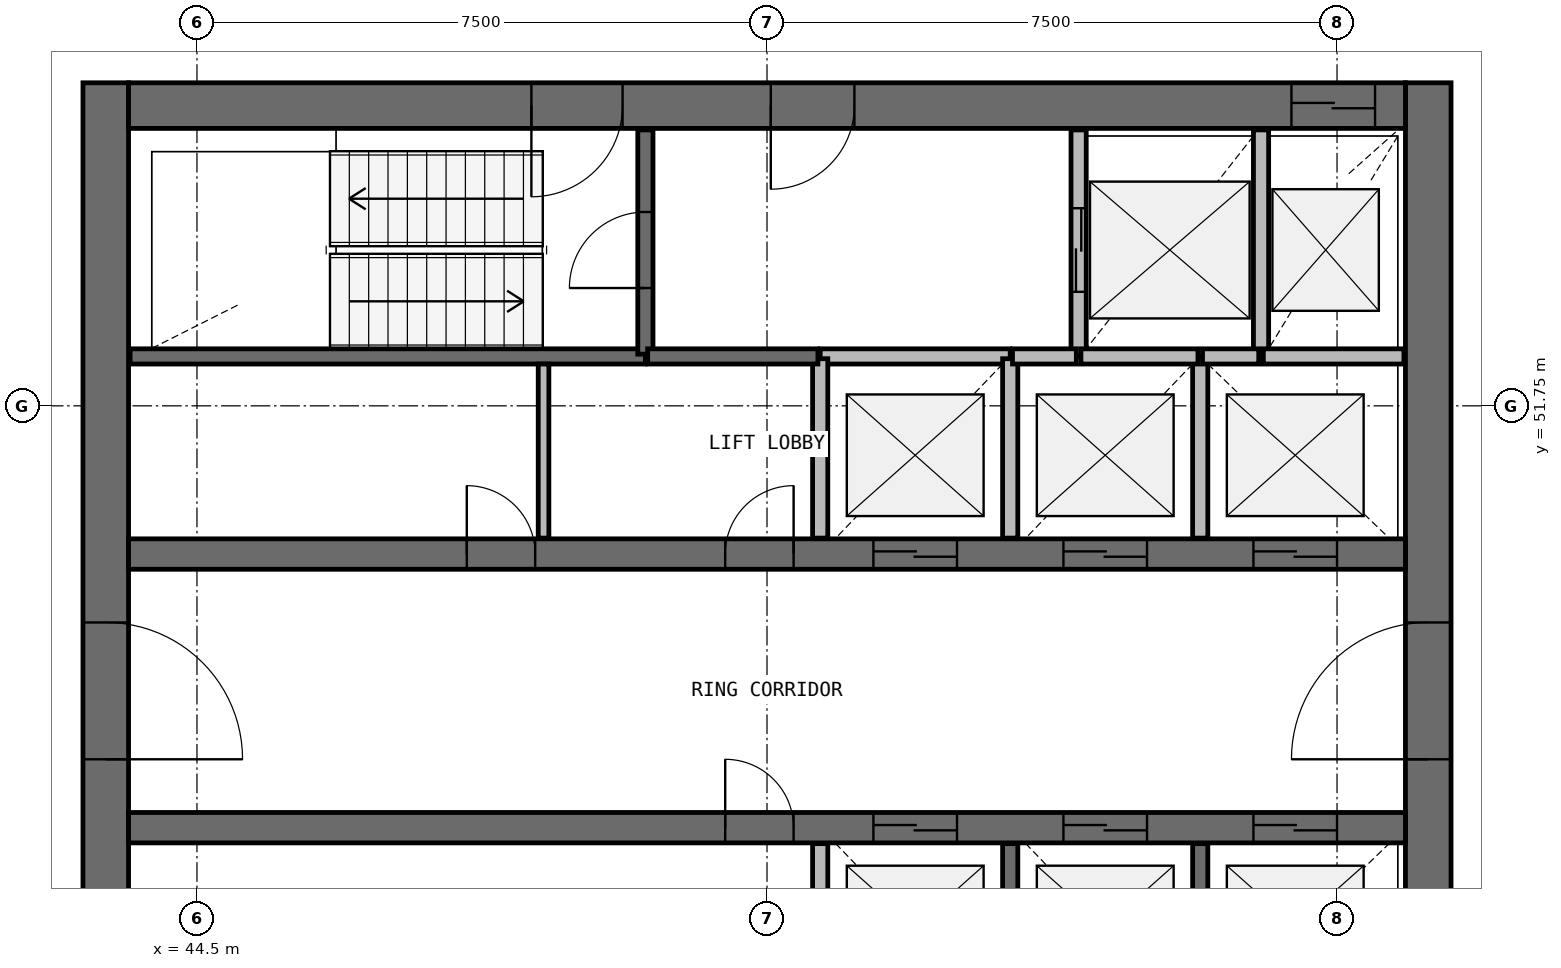
"""IFC4 building model, lengths in metres.
Left out: names, types, materials, properties, quantities, classifications, styles, units other than length and angle.
Written with IfcOpenShell. Run it as: python <this file> out.ifc"""

import sys

from ifc_helpers import new_model, si_unit, direction, frame, frame_2d, origin, place, context, subcontext, project, spatial, rectangle, extrude, source, transform, mapped, element, fill, save


model = new_model("IFC4")
c1 = context("Model", 3, precision=1e-05, world=origin(), true_north=direction((0.0, 1.0)))
c2 = subcontext(c1, "Body", "Model", "MODEL_VIEW")
j1 = project(units=[si_unit("LENGTHUNIT", "METRE"), si_unit("PLANEANGLEUNIT", "RADIAN")], contexts=[c1])
p1 = place(None, origin())
s1 = spatial("IfcSite", under=j1, at=p1, CompositionType="ELEMENT")
p2 = place(p1, origin())
s2 = spatial("IfcBuilding", under=s1, at=p2, CompositionType="ELEMENT")
p3 = place(p2, frame((0.0, 0.0, 234.5)))
s3 = spatial("IfcBuildingStorey", under=s2, at=p3, CompositionType="ELEMENT", Elevation=234.5)
p4 = place(p3, frame((60.7, 40.0, 0.0), z_axis=(0.0, 0.0, 1.0), x_axis=(0.0, 1.0, 0.0)))
e1 = element("IfcWall", 1, at=p4, inside=s3, PredefinedType="SHEAR", context=c2, shape_type="SweptSolid", body=[
    extrude(rectangle(XDim=16.0, YDim=0.6, at=frame_2d((8.0, 0.0))), origin(), (0.0, 0.0, 1.0), 3.9),
])
p5 = place(p4, frame((7.1, 0.0, 0.0)))
e2 = element("IfcOpeningElement", 2, at=p5, cuts=e1, PredefinedType="OPENING", context=c2, shape_type="SweptSolid", body=[
    extrude(rectangle(XDim=1.8, YDim=2.1, at=frame_2d((0.9, 1.05))), frame((0.0, 0.31, 0.0), z_axis=(0.0, -1.0, 0.0), x_axis=(1.0, 0.0, 0.0)), (0.0, 0.0, 1.0), 0.62),
])
p6 = place(p3, frame((43.3, 56.0, 0.0), z_axis=(0.0, 0.0, 1.0), x_axis=(0.0, -1.0, 0.0)))
e3 = element("IfcWall", 3, at=p6, inside=s3, PredefinedType="SHEAR", context=c2, shape_type="SweptSolid", body=[
    extrude(rectangle(XDim=16.0, YDim=0.6, at=frame_2d((8.0, 0.0))), origin(), (0.0, 0.0, 1.0), 3.9),
])
p7 = place(p6, frame((7.1, 0.0, 0.0)))
e4 = element("IfcOpeningElement", 4, at=p7, cuts=e3, PredefinedType="OPENING", context=c2, shape_type="SweptSolid", body=[
    extrude(rectangle(XDim=1.8, YDim=2.1, at=frame_2d((0.9, 1.05))), frame((0.0, 0.31, 0.0), z_axis=(0.0, -1.0, 0.0), x_axis=(1.0, 0.0, 0.0)), (0.0, 0.0, 1.0), 0.62),
])
p8 = place(p3, frame((60.4, 55.7, 0.0), z_axis=(0.0, 0.0, 1.0), x_axis=(-1.0, 0.0, 0.0)))
e5 = element("IfcWall", 5, at=p8, inside=s3, PredefinedType="SHEAR", context=c2, shape_type="SweptSolid", body=[
    extrude(rectangle(XDim=16.8, YDim=0.6, at=frame_2d((8.4, 0.0))), origin(), (0.0, 0.0, 1.0), 3.9),
])
p9 = place(p8, frame((0.4, 0.0, 0.0)))
e6 = element("IfcOpeningElement", 6, at=p9, cuts=e5, PredefinedType="OPENING", context=c2, shape_type="SweptSolid", body=[
    extrude(rectangle(XDim=1.1, YDim=2.1, at=frame_2d((0.55, 1.05))), frame((0.0, 0.31, 0.0), z_axis=(0.0, -1.0, 0.0), x_axis=(1.0, 0.0, 0.0)), (0.0, 0.0, 1.0), 0.62),
])
p10 = place(p8, frame((10.3, 0.0, 0.0)))
e7 = element("IfcOpeningElement", 7, at=p10, cuts=e5, PredefinedType="OPENING", context=c2, shape_type="SweptSolid", body=[
    extrude(rectangle(XDim=1.2, YDim=2.1, at=frame_2d((0.6, 1.05))), frame((0.0, 0.31, 0.0), z_axis=(0.0, -1.0, 0.0), x_axis=(1.0, 0.0, 0.0)), (0.0, 0.0, 1.0), 0.62),
])
p11 = place(p8, frame((7.25, 0.0, 0.0)))
e8 = element("IfcOpeningElement", 8, at=p11, cuts=e5, PredefinedType="OPENING", context=c2, shape_type="SweptSolid", body=[
    extrude(rectangle(XDim=1.1, YDim=2.1, at=frame_2d((0.55, 1.05))), frame((0.0, 0.31, 0.0), z_axis=(0.0, -1.0, 0.0), x_axis=(1.0, 0.0, 0.0)), (0.0, 0.0, 1.0), 0.62),
])
p12 = place(p3, frame((43.6, 49.8, 0.0), z_axis=(0.0, 0.0, 1.0), x_axis=(1.0, 0.0, 0.0)))
e9 = element("IfcWall", 9, at=p12, inside=s3, PredefinedType="SHEAR", context=c2, shape_type="SweptSolid", body=[
    extrude(rectangle(XDim=16.8, YDim=0.4, at=frame_2d((8.4, 0.0))), origin(), (0.0, 0.0, 1.0), 3.9),
])
p13 = place(p12, frame((9.8, 0.0, 0.0)))
e10 = element("IfcOpeningElement", 10, at=p13, cuts=e9, PredefinedType="OPENING", context=c2, shape_type="SweptSolid", body=[
    extrude(rectangle(XDim=1.1, YDim=2.1, at=frame_2d((0.55, 1.05))), frame((0.0, 0.21, 0.0), z_axis=(0.0, -1.0, 0.0), x_axis=(1.0, 0.0, 0.0)), (0.0, 0.0, 1.0), 0.42),
])
p14 = place(p12, frame((12.3, 0.0, 0.0)))
e11 = element("IfcOpeningElement", 11, at=p14, cuts=e9, PredefinedType="OPENING", context=c2, shape_type="SweptSolid", body=[
    extrude(rectangle(XDim=1.1, YDim=2.1, at=frame_2d((0.55, 1.05))), frame((0.0, 0.21, 0.0), z_axis=(0.0, -1.0, 0.0), x_axis=(1.0, 0.0, 0.0)), (0.0, 0.0, 1.0), 0.42),
])
p15 = place(p12, frame((14.8, 0.0, 0.0)))
e12 = element("IfcOpeningElement", 12, at=p15, cuts=e9, PredefinedType="OPENING", context=c2, shape_type="SweptSolid", body=[
    extrude(rectangle(XDim=1.1, YDim=2.1, at=frame_2d((0.55, 1.05))), frame((0.0, 0.21, 0.0), z_axis=(0.0, -1.0, 0.0), x_axis=(1.0, 0.0, 0.0)), (0.0, 0.0, 1.0), 0.42),
])
p16 = place(p12, frame((4.45, 0.0, 0.0)))
e13 = element("IfcOpeningElement", 13, at=p16, cuts=e9, PredefinedType="OPENING", context=c2, shape_type="SweptSolid", body=[
    extrude(rectangle(XDim=0.9, YDim=2.1, at=frame_2d((0.45, 1.05))), frame((0.0, 0.21, 0.0), z_axis=(0.0, -1.0, 0.0), x_axis=(1.0, 0.0, 0.0)), (0.0, 0.0, 1.0), 0.42),
])
p17 = place(p12, frame((7.85, 0.0, 0.0)))
e14 = element("IfcOpeningElement", 14, at=p17, cuts=e9, PredefinedType="OPENING", context=c2, shape_type="SweptSolid", body=[
    extrude(rectangle(XDim=0.9, YDim=2.1, at=frame_2d((0.45, 1.05))), frame((0.0, 0.21, 0.0), z_axis=(0.0, -1.0, 0.0), x_axis=(1.0, 0.0, 0.0)), (0.0, 0.0, 1.0), 0.42),
])
p18 = place(p3, frame((43.6, 46.2, 0.0), z_axis=(0.0, 0.0, 1.0), x_axis=(1.0, 0.0, 0.0)))
e15 = element("IfcWall", 15, at=p18, inside=s3, PredefinedType="SHEAR", context=c2, shape_type="SweptSolid", body=[
    extrude(rectangle(XDim=16.8, YDim=0.4, at=frame_2d((8.4, 0.0))), origin(), (0.0, 0.0, 1.0), 3.9),
])
p19 = place(p18, frame((9.8, 0.0, 0.0)))
e16 = element("IfcOpeningElement", 16, at=p19, cuts=e15, PredefinedType="OPENING", context=c2, shape_type="SweptSolid", body=[
    extrude(rectangle(XDim=1.1, YDim=2.1, at=frame_2d((0.55, 1.05))), frame((0.0, 0.21, 0.0), z_axis=(0.0, -1.0, 0.0), x_axis=(1.0, 0.0, 0.0)), (0.0, 0.0, 1.0), 0.42),
])
p20 = place(p18, frame((12.3, 0.0, 0.0)))
e17 = element("IfcOpeningElement", 17, at=p20, cuts=e15, PredefinedType="OPENING", context=c2, shape_type="SweptSolid", body=[
    extrude(rectangle(XDim=1.1, YDim=2.1, at=frame_2d((0.55, 1.05))), frame((0.0, 0.21, 0.0), z_axis=(0.0, -1.0, 0.0), x_axis=(1.0, 0.0, 0.0)), (0.0, 0.0, 1.0), 0.42),
])
p21 = place(p18, frame((14.8, 0.0, 0.0)))
e18 = element("IfcOpeningElement", 18, at=p21, cuts=e15, PredefinedType="OPENING", context=c2, shape_type="SweptSolid", body=[
    extrude(rectangle(XDim=1.1, YDim=2.1, at=frame_2d((0.55, 1.05))), frame((0.0, 0.21, 0.0), z_axis=(0.0, -1.0, 0.0), x_axis=(1.0, 0.0, 0.0)), (0.0, 0.0, 1.0), 0.42),
])
p22 = place(p18, frame((7.85, 0.0, 0.0)))
e19 = element("IfcOpeningElement", 19, at=p22, cuts=e15, PredefinedType="OPENING", context=c2, shape_type="SweptSolid", body=[
    extrude(rectangle(XDim=0.9, YDim=2.1, at=frame_2d((0.45, 1.05))), frame((0.0, 0.21, 0.0), z_axis=(0.0, -1.0, 0.0), x_axis=(1.0, 0.0, 0.0)), (0.0, 0.0, 1.0), 0.42),
])
p23 = place(p3, frame((43.62, 52.4, 0.0), z_axis=(0.0, 0.0, 1.0), x_axis=(1.0, 0.0, 0.0)))
e20 = element("IfcWall", 20, at=p23, inside=s3, PredefinedType="SOLIDWALL", context=c2, shape_type="SweptSolid", body=[
    extrude(rectangle(XDim=6.78, YDim=0.2, at=frame_2d((3.39, 0.0))), origin(), (0.0, 0.0, 1.0), 3.58),
])
p24 = place(p3, frame((50.4, 52.43, 0.0), z_axis=(0.0, 0.0, 1.0), x_axis=(0.0, 1.0, 0.0)))
e21 = element("IfcWall", 21, at=p24, inside=s3, PredefinedType="SOLIDWALL", context=c2, shape_type="SweptSolid", body=[
    extrude(rectangle(XDim=2.95, YDim=0.2, at=frame_2d((1.475, 0.0))), origin(), (0.0, 0.0, 1.0), 3.58),
])
p25 = place(p24, frame((0.87, 0.0, 0.0)))
e22 = element("IfcOpeningElement", 22, at=p25, cuts=e21, PredefinedType="OPENING", context=c2, shape_type="SweptSolid", body=[
    extrude(rectangle(XDim=1.0, YDim=2.1, at=frame_2d((0.5, 1.05))), frame((0.0, 0.11, 0.0), z_axis=(0.0, -1.0, 0.0), x_axis=(1.0, 0.0, 0.0)), (0.0, 0.0, 1.0), 0.22),
])
p26 = place(p3, frame((56.1, 55.38, 0.0), z_axis=(0.0, 0.0, 1.0), x_axis=(0.0, -1.0, 0.0)))
e23 = element("IfcWall", 23, at=p26, inside=s3, PredefinedType="SOLIDWALL", context=c2, shape_type="SweptSolid", body=[
    extrude(rectangle(XDim=2.98, YDim=0.2, at=frame_2d((1.49, 0.0))), origin(), (0.0, 0.0, 1.0), 3.58),
])
p27 = place(p26, frame((1.03, 0.0, 0.0)))
e24 = element("IfcOpeningElement", 24, at=p27, cuts=e23, PredefinedType="OPENING", context=c2, shape_type="SweptSolid", body=[
    extrude(rectangle(XDim=1.1, YDim=2.1, at=frame_2d((0.55, 1.05))), frame((0.0, 0.11, 0.0), z_axis=(0.0, -1.0, 0.0), x_axis=(1.0, 0.0, 0.0)), (0.0, 0.0, 1.0), 0.22),
])
p28 = place(p3, frame((58.5, 52.4, 0.0), z_axis=(0.0, 0.0, 1.0), x_axis=(0.0, 1.0, 0.0)))
e25 = element("IfcWall", 25, at=p28, inside=s3, PredefinedType="SOLIDWALL", context=c2, shape_type="SweptSolid", body=[
    extrude(rectangle(XDim=2.98, YDim=0.2, at=frame_2d((1.49, 0.0))), origin(), (0.0, 0.0, 1.0), 3.58),
])
p29 = place(p3, frame((55.2, 52.4, 0.0), z_axis=(0.0, 0.0, 1.0), x_axis=(-1.0, 0.0, 0.0)))
e26 = element("IfcWall", 26, at=p29, inside=s3, PredefinedType="SOLIDWALL", context=c2, shape_type="SweptSolid", body=[
    extrude(rectangle(XDim=2.5, YDim=0.2, at=frame_2d((1.25, 0.0))), origin(), (0.0, 0.0, 1.0), 3.58),
])
for number, where, z_axis, x_axis in (
    (27, (52.7, 45.99, 0.0), (0.0, 0.0, 1.0), (0.0, -1.0, 0.0)),
    (28, (52.7, 52.37, 0.0), (0.0, 0.0, 1.0), (0.0, -1.0, 0.0)),
    (29, (55.2, 43.63, 0.0), (0.0, 0.0, 1.0), (0.0, 1.0, 0.0)),
    (30, (55.2, 50.01, 0.0), (0.0, 0.0, 1.0), (0.0, 1.0, 0.0)),
    (31, (57.7, 43.63, 0.0), (0.0, 0.0, 1.0), (0.0, 1.0, 0.0)),
):
    element("IfcWall", number, at=place(p3, frame(where, z_axis=z_axis, x_axis=x_axis)), inside=s3, PredefinedType="SOLIDWALL", context=c2, shape_type="SweptSolid", body=[
        extrude(rectangle(XDim=2.36, YDim=0.2, at=frame_2d((1.18, 0.0))), origin(), (0.0, 0.0, 1.0), 3.58),
    ])
p30 = place(p3, frame((57.7, 50.01, 0.0), z_axis=(0.0, 0.0, 1.0), x_axis=(0.0, 1.0, 0.0)))
e32 = element("IfcWall", 32, at=p30, inside=s3, PredefinedType="SOLIDWALL", context=c2, shape_type="SweptSolid", body=[
    extrude(rectangle(XDim=2.39, YDim=0.2, at=frame_2d((1.195, 0.0))), origin(), (0.0, 0.0, 1.0), 3.58),
])
p31 = place(p3, frame((50.43, 52.4, 0.0), z_axis=(0.0, 0.0, 1.0), x_axis=(1.0, 0.0, 0.0)))
e33 = element("IfcWall", 33, at=p31, inside=s3, PredefinedType="SOLIDWALL", context=c2, shape_type="SweptSolid", body=[
    extrude(rectangle(XDim=2.24, YDim=0.2, at=frame_2d((1.12, 0.0))), origin(), (0.0, 0.0, 1.0), 3.58),
])
p32 = place(p3, frame((60.38, 52.4, 0.0), z_axis=(0.0, 0.0, 1.0), x_axis=(-1.0, 0.0, 0.0)))
e34 = element("IfcWall", 34, at=p32, inside=s3, PredefinedType="SOLIDWALL", context=c2, shape_type="SweptSolid", body=[
    extrude(rectangle(XDim=1.85, YDim=0.2, at=frame_2d((0.925, 0.0))), origin(), (0.0, 0.0, 1.0), 3.58),
])
p33 = place(p3, frame((57.67, 52.4, 0.0), z_axis=(0.0, 0.0, 1.0), x_axis=(-1.0, 0.0, 0.0)))
e35 = element("IfcWall", 35, at=p33, inside=s3, PredefinedType="SOLIDWALL", context=c2, shape_type="SweptSolid", body=[
    extrude(rectangle(XDim=1.54, YDim=0.2, at=frame_2d((0.77, 0.0))), origin(), (0.0, 0.0, 1.0), 3.58),
])
p34 = place(p3, frame((56.07, 52.4, 0.0), z_axis=(0.0, 0.0, 1.0), x_axis=(-1.0, 0.0, 0.0)))
e36 = element("IfcWall", 36, at=p34, inside=s3, PredefinedType="SOLIDWALL", context=c2, shape_type="SweptSolid", body=[
    extrude(rectangle(XDim=0.84, YDim=0.2, at=frame_2d((0.42, 0.0))), origin(), (0.0, 0.0, 1.0), 3.58),
])
p35 = place(p3, frame((58.47, 52.4, 0.0), z_axis=(0.0, 0.0, 1.0), x_axis=(-1.0, 0.0, 0.0)))
e37 = element("IfcWall", 37, at=p35, inside=s3, PredefinedType="SOLIDWALL", context=c2, shape_type="SweptSolid", body=[
    extrude(rectangle(XDim=0.74, YDim=0.2, at=frame_2d((0.37, 0.0))), origin(), (0.0, 0.0, 1.0), 3.58),
])
p36 = place(p3, frame((49.06, 50.01, 0.0), z_axis=(0.0, 0.0, 1.0), x_axis=(0.0, 1.0, 0.0)))
e38 = element("IfcWall", 38, at=p36, inside=s3, PredefinedType="PARTITIONING", context=c2, shape_type="SweptSolid", body=[
    extrude(rectangle(XDim=2.29, YDim=0.14, at=frame_2d((1.145, 0.0))), origin(), (0.0, 0.0, 1.0), 2.88),
])
m1 = source(origin(), c2, "Body", "SweptSolid", [
    extrude(rectangle(XDim=1.8, YDim=2.1, at=frame_2d((0.9, 1.05))), frame((0.0, 0.025, 0.0), z_axis=(0.0, -1.0, 0.0), x_axis=(1.0, 0.0, 0.0)), (0.0, 0.0, 1.0), 0.05),
])
p37 = place(p7, origin())
e39 = element("IfcDoor", 39, at=p37, inside=s3, OperationType="SINGLE_SWING_RIGHT", PredefinedType="DOOR", context=c2, shape_type="MappedRepresentation", body=[
    mapped(m1, transform((0.0, 0.0, 0.0), scale=1.0)),
])
fill(e4, e39)
p38 = place(p5, origin())
e40 = element("IfcDoor", 40, at=p38, inside=s3, OperationType="SINGLE_SWING_LEFT", PredefinedType="DOOR", context=c2, shape_type="MappedRepresentation", body=[
    mapped(m1, transform((0.0, 0.0, 0.0), scale=1.0)),
])
fill(e2, e40)
m2 = source(origin(), c2, "Body", "SweptSolid", [
    extrude(rectangle(XDim=1.1, YDim=2.1, at=frame_2d((0.55, 1.05))), frame((0.0, 0.025, 0.0), z_axis=(0.0, -1.0, 0.0), x_axis=(1.0, 0.0, 0.0)), (0.0, 0.0, 1.0), 0.05),
])
p39 = place(p13, origin())
e41 = element("IfcDoor", 41, at=p39, inside=s3, OperationType="DOUBLE_DOOR_SLIDING", PredefinedType="USERDEFINED", context=c2, shape_type="MappedRepresentation", body=[
    mapped(m2, transform((0.0, 0.0, 0.0), scale=1.0)),
])
fill(e10, e41)
p40 = place(p14, origin())
e42 = element("IfcDoor", 42, at=p40, inside=s3, OperationType="DOUBLE_DOOR_SLIDING", PredefinedType="USERDEFINED", context=c2, shape_type="MappedRepresentation", body=[
    mapped(m2, transform((0.0, 0.0, 0.0), scale=1.0)),
])
fill(e11, e42)
p41 = place(p15, origin())
e43 = element("IfcDoor", 43, at=p41, inside=s3, OperationType="DOUBLE_DOOR_SLIDING", PredefinedType="USERDEFINED", context=c2, shape_type="MappedRepresentation", body=[
    mapped(m2, transform((0.0, 0.0, 0.0), scale=1.0)),
])
fill(e12, e43)
p42 = place(p19, origin())
e44 = element("IfcDoor", 44, at=p42, inside=s3, OperationType="DOUBLE_DOOR_SLIDING", PredefinedType="USERDEFINED", context=c2, shape_type="MappedRepresentation", body=[
    mapped(m2, transform((0.0, 0.0, 0.0), scale=1.0)),
])
fill(e16, e44)
p43 = place(p20, origin())
e45 = element("IfcDoor", 45, at=p43, inside=s3, OperationType="DOUBLE_DOOR_SLIDING", PredefinedType="USERDEFINED", context=c2, shape_type="MappedRepresentation", body=[
    mapped(m2, transform((0.0, 0.0, 0.0), scale=1.0)),
])
fill(e17, e45)
p44 = place(p21, origin())
e46 = element("IfcDoor", 46, at=p44, inside=s3, OperationType="DOUBLE_DOOR_SLIDING", PredefinedType="USERDEFINED", context=c2, shape_type="MappedRepresentation", body=[
    mapped(m2, transform((0.0, 0.0, 0.0), scale=1.0)),
])
fill(e18, e46)
p45 = place(p27, origin())
e47 = element("IfcDoor", 47, at=p45, inside=s3, OperationType="DOUBLE_DOOR_SLIDING", PredefinedType="USERDEFINED", context=c2, shape_type="MappedRepresentation", body=[
    mapped(m2, transform((0.0, 0.0, 0.0), scale=1.0)),
])
fill(e24, e47)
p46 = place(p9, origin())
e48 = element("IfcDoor", 48, at=p46, inside=s3, OperationType="DOUBLE_DOOR_SLIDING", PredefinedType="USERDEFINED", context=c2, shape_type="MappedRepresentation", body=[
    mapped(m2, transform((0.0, 0.0, 0.0), scale=1.0)),
])
fill(e6, e48)
m3 = source(origin(), c2, "Body", "SweptSolid", [
    extrude(rectangle(XDim=1.2, YDim=2.1, at=frame_2d((0.6, 1.05))), frame((0.0, 0.025, 0.0), z_axis=(0.0, -1.0, 0.0), x_axis=(1.0, 0.0, 0.0)), (0.0, 0.0, 1.0), 0.05),
])
p47 = place(p10, origin())
e49 = element("IfcDoor", 49, at=p47, inside=s3, OperationType="SINGLE_SWING_RIGHT", PredefinedType="DOOR", context=c2, shape_type="MappedRepresentation", body=[
    mapped(m3, transform((0.0, 0.0, 0.0), scale=1.0)),
])
fill(e7, e49)
m4 = source(origin(), c2, "Body", "SweptSolid", [
    extrude(rectangle(XDim=1.0, YDim=2.1, at=frame_2d((0.5, 1.05))), frame((0.0, 0.025, 0.0), z_axis=(0.0, -1.0, 0.0), x_axis=(1.0, 0.0, 0.0)), (0.0, 0.0, 1.0), 0.05),
])
p48 = place(p25, origin())
e50 = element("IfcDoor", 50, at=p48, inside=s3, OperationType="SINGLE_SWING_LEFT", PredefinedType="DOOR", context=c2, shape_type="MappedRepresentation", body=[
    mapped(m4, transform((0.0, 0.0, 0.0), scale=1.0)),
])
fill(e22, e50)
m5 = source(origin(), c2, "Body", "SweptSolid", [
    extrude(rectangle(XDim=1.1, YDim=2.1, at=frame_2d((0.55, 1.05))), frame((0.0, 0.025, 0.0), z_axis=(0.0, -1.0, 0.0), x_axis=(1.0, 0.0, 0.0)), (0.0, 0.0, 1.0), 0.05),
])
p49 = place(p11, origin())
e51 = element("IfcDoor", 51, at=p49, inside=s3, OperationType="SINGLE_SWING_RIGHT", PredefinedType="DOOR", context=c2, shape_type="MappedRepresentation", body=[
    mapped(m5, transform((0.0, 0.0, 0.0), scale=1.0)),
])
fill(e8, e51)
m6 = source(origin(), c2, "Body", "SweptSolid", [
    extrude(rectangle(XDim=0.9, YDim=2.1, at=frame_2d((0.45, 1.05))), frame((0.0, 0.025, 0.0), z_axis=(0.0, -1.0, 0.0), x_axis=(1.0, 0.0, 0.0)), (0.0, 0.0, 1.0), 0.05),
])
p50 = place(p16, origin())
e52 = element("IfcDoor", 52, at=p50, inside=s3, OperationType="SINGLE_SWING_LEFT", PredefinedType="DOOR", context=c2, shape_type="MappedRepresentation", body=[
    mapped(m6, transform((0.0, 0.0, 0.0), scale=1.0)),
])
fill(e13, e52)
p51 = place(p17, origin())
e53 = element("IfcDoor", 53, at=p51, inside=s3, OperationType="SINGLE_SWING_RIGHT", PredefinedType="DOOR", context=c2, shape_type="MappedRepresentation", body=[
    mapped(m6, transform((0.0, 0.0, 0.0), scale=1.0)),
])
fill(e14, e53)
p52 = place(p22, origin())
e54 = element("IfcDoor", 54, at=p52, inside=s3, OperationType="SINGLE_SWING_LEFT", PredefinedType="DOOR", context=c2, shape_type="MappedRepresentation", body=[
    mapped(m6, transform((0.0, 0.0, 0.0), scale=1.0)),
])
fill(e19, e54)
save(model, sys.argv[1])
